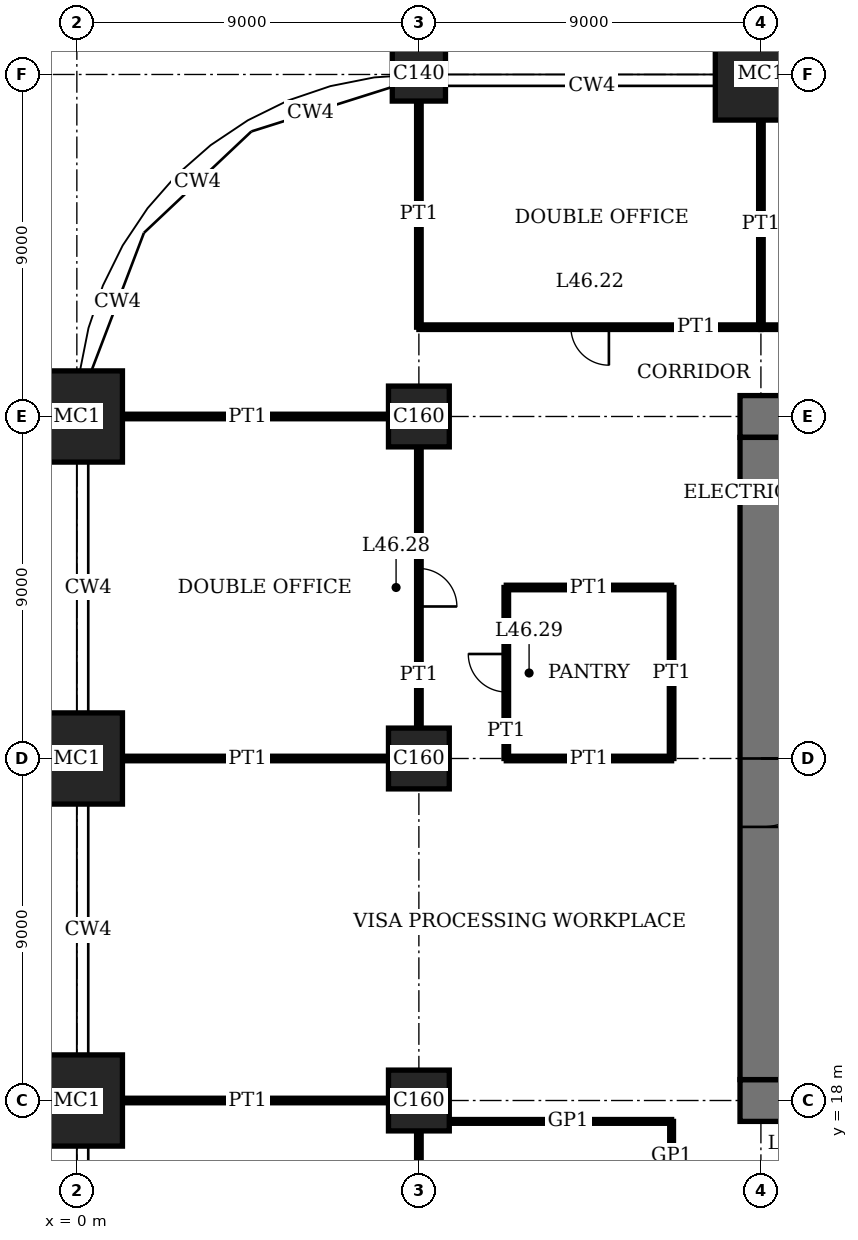
"""IFC4 building model, lengths in metres.
Left out: names, types, materials, properties, quantities, classifications, styles, units other than length and angle.
Written with IfcOpenShell. Run it as: python <this file> out.ifc"""

import sys

from ifc_helpers import new_model, si_unit, direction, frame, frame_2d, origin, origin_2d, place, context, subcontext, project, spatial, rectangle, extrude, element, fill, save


model = new_model("IFC4")
c1 = context("Model", 3, precision=1e-05, world=origin(), true_north=direction((0.0, 1.0)))
c2 = subcontext(c1, "Body", "Model", "MODEL_VIEW")
j1 = project(units=[si_unit("LENGTHUNIT", "METRE"), si_unit("PLANEANGLEUNIT", "RADIAN")], contexts=[c1])
p1 = place(None, origin())
s1 = spatial("IfcSite", under=j1, at=p1, CompositionType="ELEMENT")
p2 = place(p1, origin())
s2 = spatial("IfcBuilding", under=s1, at=p2, CompositionType="ELEMENT")
p3 = place(p2, frame((0.0, 0.0, 190.2)))
s3 = spatial("IfcBuildingStorey", under=s2, at=p3, CompositionType="ELEMENT", Elevation=190.2)
for number, where, z_axis, x_axis in (
    (1, (0.0, 18.0, 0.0), (0.0, 0.0, 1.0), (1.0, 0.0, 0.0)),
    (2, (0.0, 27.0, 0.0), (0.0, 0.0, 1.0), (1.0, 0.0, 0.0)),
    (3, (0.0, 36.0, 0.0), (0.0, 0.0, 1.0), (1.0, 0.0, 0.0)),
):
    element("IfcColumn", number, at=place(p3, frame(where, z_axis=z_axis, x_axis=x_axis)), inside=s3, PredefinedType="COLUMN", context=c2, shape_type="SweptSolid", body=[
        extrude(rectangle(XDim=2.4, YDim=2.4, at=origin_2d()), origin(), (0.0, 0.0, 1.0), 4.0),
    ])
for number, where, z_axis, x_axis in (
    (4, (9.0, 18.0, 0.0), (0.0, 0.0, 1.0), (1.0, 0.0, 0.0)),
    (5, (9.0, 27.0, 0.0), (0.0, 0.0, 1.0), (1.0, 0.0, 0.0)),
    (6, (9.0, 36.0, 0.0), (0.0, 0.0, 1.0), (1.0, 0.0, 0.0)),
):
    element("IfcColumn", number, at=place(p3, frame(where, z_axis=z_axis, x_axis=x_axis)), inside=s3, PredefinedType="COLUMN", context=c2, shape_type="SweptSolid", body=[
        extrude(rectangle(XDim=1.6, YDim=1.6, at=origin_2d()), origin(), (0.0, 0.0, 1.0), 4.0),
    ])
p4 = place(p3, frame((9.0, 45.0, 0.0), z_axis=(0.0, 0.0, 1.0), x_axis=(1.0, 0.0, 0.0)))
e7 = element("IfcColumn", 7, at=p4, inside=s3, PredefinedType="COLUMN", context=c2, shape_type="SweptSolid", body=[
    extrude(rectangle(XDim=1.4, YDim=1.4, at=origin_2d()), origin(), (0.0, 0.0, 1.0), 4.0),
])
p5 = place(p3, frame((18.0, 45.0, 0.0), z_axis=(0.0, 0.0, 1.0), x_axis=(1.0, 0.0, 0.0)))
e8 = element("IfcColumn", 8, at=p5, inside=s3, PredefinedType="COLUMN", context=c2, shape_type="SweptSolid", body=[
    extrude(rectangle(XDim=2.4, YDim=2.4, at=origin_2d()), origin(), (0.0, 0.0, 1.0), 4.0),
])
p6 = place(p3, frame((17.45, 18.0, 0.0), z_axis=(0.0, 0.0, 1.0), x_axis=(1.0, 0.0, 0.0)))
e9 = element("IfcWall", 9, at=p6, inside=s3, PredefinedType="SHEAR", context=c2, shape_type="SweptSolid", body=[
    extrude(rectangle(XDim=28.1, YDim=1.1, at=frame_2d((14.05, 0.0))), origin(), (0.0, 0.0, 1.0), 4.0),
])
p7 = place(p6, frame((11.55, 0.0, 0.0)))
e10 = element("IfcOpeningElement", 10, at=p7, cuts=e9, PredefinedType="OPENING", context=c2, shape_type="SweptSolid", body=[
    extrude(rectangle(XDim=1.0, YDim=2.4, at=frame_2d((0.5, 1.2))), frame((0.0, 0.56, 0.0), z_axis=(0.0, -1.0, 0.0), x_axis=(1.0, 0.0, 0.0)), (0.0, 0.0, 1.0), 1.12),
])
p8 = place(p6, frame((16.55, 0.0, 0.0)))
e11 = element("IfcOpeningElement", 11, at=p8, cuts=e9, PredefinedType="OPENING", context=c2, shape_type="SweptSolid", body=[
    extrude(rectangle(XDim=1.0, YDim=2.4, at=frame_2d((0.5, 1.2))), frame((0.0, 0.56, 0.0), z_axis=(0.0, -1.0, 0.0), x_axis=(1.0, 0.0, 0.0)), (0.0, 0.0, 1.0), 1.12),
])
p9 = place(p6, frame((20.0, 0.0, 0.0)))
e12 = element("IfcOpeningElement", 12, at=p9, cuts=e9, PredefinedType="OPENING", context=c2, shape_type="SweptSolid", body=[
    extrude(rectangle(XDim=1.1, YDim=2.4, at=frame_2d((0.55, 1.2))), frame((0.0, 0.56, 0.0), z_axis=(0.0, -1.0, 0.0), x_axis=(1.0, 0.0, 0.0)), (0.0, 0.0, 1.0), 1.12),
])
p10 = place(p6, frame((24.05, 0.0, 0.0)))
e13 = element("IfcOpeningElement", 13, at=p10, cuts=e9, PredefinedType="OPENING", context=c2, shape_type="SweptSolid", body=[
    extrude(rectangle(XDim=1.0, YDim=2.4, at=frame_2d((0.5, 1.2))), frame((0.0, 0.56, 0.0), z_axis=(0.0, -1.0, 0.0), x_axis=(1.0, 0.0, 0.0)), (0.0, 0.0, 1.0), 1.12),
])
p11 = place(p3, frame((45.55, 36.0, 0.0), z_axis=(0.0, 0.0, 1.0), x_axis=(-1.0, 0.0, 0.0)))
e14 = element("IfcWall", 14, at=p11, inside=s3, PredefinedType="SHEAR", context=c2, shape_type="SweptSolid", body=[
    extrude(rectangle(XDim=28.1, YDim=1.1, at=frame_2d((14.05, 0.0))), origin(), (0.0, 0.0, 1.0), 4.0),
])
p12 = place(p11, frame((11.55, 0.0, 0.0)))
e15 = element("IfcOpeningElement", 15, at=p12, cuts=e14, PredefinedType="OPENING", context=c2, shape_type="SweptSolid", body=[
    extrude(rectangle(XDim=1.0, YDim=2.4, at=frame_2d((0.5, 1.2))), frame((0.0, 0.56, 0.0), z_axis=(0.0, -1.0, 0.0), x_axis=(1.0, 0.0, 0.0)), (0.0, 0.0, 1.0), 1.12),
])
p13 = place(p11, frame((16.55, 0.0, 0.0)))
e16 = element("IfcOpeningElement", 16, at=p13, cuts=e14, PredefinedType="OPENING", context=c2, shape_type="SweptSolid", body=[
    extrude(rectangle(XDim=1.0, YDim=2.4, at=frame_2d((0.5, 1.2))), frame((0.0, 0.56, 0.0), z_axis=(0.0, -1.0, 0.0), x_axis=(1.0, 0.0, 0.0)), (0.0, 0.0, 1.0), 1.12),
])
p14 = place(p11, frame((20.0, 0.0, 0.0)))
e17 = element("IfcOpeningElement", 17, at=p14, cuts=e14, PredefinedType="OPENING", context=c2, shape_type="SweptSolid", body=[
    extrude(rectangle(XDim=1.1, YDim=2.4, at=frame_2d((0.55, 1.2))), frame((0.0, 0.56, 0.0), z_axis=(0.0, -1.0, 0.0), x_axis=(1.0, 0.0, 0.0)), (0.0, 0.0, 1.0), 1.12),
])
p15 = place(p11, frame((24.05, 0.0, 0.0)))
e18 = element("IfcOpeningElement", 18, at=p15, cuts=e14, PredefinedType="OPENING", context=c2, shape_type="SweptSolid", body=[
    extrude(rectangle(XDim=1.0, YDim=2.4, at=frame_2d((0.5, 1.2))), frame((0.0, 0.56, 0.0), z_axis=(0.0, -1.0, 0.0), x_axis=(1.0, 0.0, 0.0)), (0.0, 0.0, 1.0), 1.12),
])
p16 = place(p3, frame((18.0, 35.45, 0.0), z_axis=(0.0, 0.0, 1.0), x_axis=(0.0, -1.0, 0.0)))
e19 = element("IfcWall", 19, at=p16, inside=s3, PredefinedType="SHEAR", context=c2, shape_type="SweptSolid", body=[
    extrude(rectangle(XDim=16.9, YDim=1.1, at=frame_2d((8.45, 0.0))), origin(), (0.0, 0.0, 1.0), 4.0),
])
p17 = place(p16, frame((8.45, 0.0, 0.0)))
e20 = element("IfcOpeningElement", 20, at=p17, cuts=e19, PredefinedType="OPENING", context=c2, shape_type="SweptSolid", body=[
    extrude(rectangle(XDim=1.8, YDim=2.4, at=frame_2d((0.9, 1.2))), frame((0.0, 0.56, 0.0), z_axis=(0.0, -1.0, 0.0), x_axis=(1.0, 0.0, 0.0)), (0.0, 0.0, 1.0), 1.12),
])
p18 = place(p3, frame((9.8, 17.45, 0.0), z_axis=(0.0, 0.0, 1.0), x_axis=(1.0, 0.0, 0.0)))
e21 = element("IfcWall", 21, at=p18, inside=s3, PredefinedType="PARTITIONING", context=c2, shape_type="SweptSolid", body=[
    extrude(rectangle(XDim=5.85, YDim=0.1, at=frame_2d((2.925, 0.0))), origin(), (0.0, 0.0, 1.0), 3.75),
])
for number, where, z_axis, x_axis in (
    (22, (1.2, 18.0, 0.0), (0.0, 0.0, 1.0), (1.0, 0.0, 0.0)),
    (23, (1.2, 27.0, 0.0), (0.0, 0.0, 1.0), (1.0, 0.0, 0.0)),
):
    element("IfcWall", number, at=place(p3, frame(where, z_axis=z_axis, x_axis=x_axis)), inside=s3, PredefinedType="PARTITIONING", context=c2, shape_type="SweptSolid", body=[
        extrude(rectangle(XDim=7.0, YDim=0.12, at=frame_2d((3.5, 0.0))), origin(), (0.0, 0.0, 1.0), 3.05),
    ])
p19 = place(p3, frame((11.3, 27.0, 0.0), z_axis=(0.0, 0.0, 1.0), x_axis=(1.0, 0.0, 0.0)))
e24 = element("IfcWall", 24, at=p19, inside=s3, PredefinedType="PARTITIONING", context=c2, shape_type="SweptSolid", body=[
    extrude(rectangle(XDim=4.35, YDim=0.12, at=frame_2d((2.175, 0.0))), origin(), (0.0, 0.0, 1.0), 3.05),
])
p20 = place(p3, frame((11.3, 31.5, 0.0), z_axis=(0.0, 0.0, 1.0), x_axis=(1.0, 0.0, 0.0)))
e25 = element("IfcWall", 25, at=p20, inside=s3, PredefinedType="PARTITIONING", context=c2, shape_type="SweptSolid", body=[
    extrude(rectangle(XDim=4.35, YDim=0.12, at=frame_2d((2.175, 0.0))), origin(), (0.0, 0.0, 1.0), 3.1),
])
p21 = place(p3, frame((1.2, 36.0, 0.0), z_axis=(0.0, 0.0, 1.0), x_axis=(1.0, 0.0, 0.0)))
e26 = element("IfcWall", 26, at=p21, inside=s3, PredefinedType="PARTITIONING", context=c2, shape_type="SweptSolid", body=[
    extrude(rectangle(XDim=7.0, YDim=0.12, at=frame_2d((3.5, 0.0))), origin(), (0.0, 0.0, 1.0), 3.05),
])
p22 = place(p3, frame((9.0, 38.35, 0.0), z_axis=(0.0, 0.0, 1.0), x_axis=(1.0, 0.0, 0.0)))
e27 = element("IfcWall", 27, at=p22, inside=s3, PredefinedType="PARTITIONING", context=c2, shape_type="SweptSolid", body=[
    extrude(rectangle(XDim=9.0, YDim=0.12, at=frame_2d((4.5, 0.0))), origin(), (0.0, 0.0, 1.0), 3.75),
])
p23 = place(p22, frame((4.0, 0.0, 0.0)))
e28 = element("IfcOpeningElement", 28, at=p23, cuts=e27, PredefinedType="OPENING", context=c2, shape_type="SweptSolid", body=[
    extrude(rectangle(XDim=1.0, YDim=2.4, at=frame_2d((0.5, 1.2))), frame((0.0, 0.07, 0.0), z_axis=(0.0, -1.0, 0.0), x_axis=(1.0, 0.0, 0.0)), (0.0, 0.0, 1.0), 0.14),
])
p24 = place(p3, frame((18.0, 38.35, 0.0), z_axis=(0.0, 0.0, 1.0), x_axis=(1.0, 0.0, 0.0)))
e29 = element("IfcWall", 29, at=p24, inside=s3, PredefinedType="PARTITIONING", context=c2, shape_type="SweptSolid", body=[
    extrude(rectangle(XDim=9.0, YDim=0.12, at=frame_2d((4.5, 0.0))), origin(), (0.0, 0.0, 1.0), 3.75),
])
p25 = place(p24, frame((4.0, 0.0, 0.0)))
e30 = element("IfcOpeningElement", 30, at=p25, cuts=e29, PredefinedType="OPENING", context=c2, shape_type="SweptSolid", body=[
    extrude(rectangle(XDim=1.0, YDim=2.4, at=frame_2d((0.5, 1.2))), frame((0.0, 0.07, 0.0), z_axis=(0.0, -1.0, 0.0), x_axis=(1.0, 0.0, 0.0)), (0.0, 0.0, 1.0), 0.14),
])
p26 = place(p3, frame((9.0, 38.35, 0.0), z_axis=(0.0, 0.0, 1.0), x_axis=(0.0, 1.0, 0.0)))
e31 = element("IfcWall", 31, at=p26, inside=s3, PredefinedType="PARTITIONING", context=c2, shape_type="SweptSolid", body=[
    extrude(rectangle(XDim=5.95, YDim=0.12, at=frame_2d((2.975, 0.0))), origin(), (0.0, 0.0, 1.0), 3.05),
])
p27 = place(p3, frame((9.0, 9.8, 0.0), z_axis=(0.0, 0.0, 1.0), x_axis=(0.0, 1.0, 0.0)))
e32 = element("IfcWall", 32, at=p27, inside=s3, PredefinedType="PARTITIONING", context=c2, shape_type="SweptSolid", body=[
    extrude(rectangle(XDim=7.4, YDim=0.12, at=frame_2d((3.7, 0.0))), origin(), (0.0, 0.0, 1.0), 3.05),
])
p28 = place(p27, frame((3.2, 0.0, 0.0)))
e33 = element("IfcOpeningElement", 33, at=p28, cuts=e32, PredefinedType="OPENING", context=c2, shape_type="SweptSolid", body=[
    extrude(rectangle(XDim=1.0, YDim=2.4, at=frame_2d((0.5, 1.2))), frame((0.0, 0.07, 0.0), z_axis=(0.0, -1.0, 0.0), x_axis=(1.0, 0.0, 0.0)), (0.0, 0.0, 1.0), 0.14),
])
p29 = place(p3, frame((9.0, 27.8, 0.0), z_axis=(0.0, 0.0, 1.0), x_axis=(0.0, 1.0, 0.0)))
e34 = element("IfcWall", 34, at=p29, inside=s3, PredefinedType="PARTITIONING", context=c2, shape_type="SweptSolid", body=[
    extrude(rectangle(XDim=7.4, YDim=0.12, at=frame_2d((3.7, 0.0))), origin(), (0.0, 0.0, 1.0), 3.05),
])
p30 = place(p29, frame((3.2, 0.0, 0.0)))
e35 = element("IfcOpeningElement", 35, at=p30, cuts=e34, PredefinedType="OPENING", context=c2, shape_type="SweptSolid", body=[
    extrude(rectangle(XDim=1.0, YDim=2.4, at=frame_2d((0.5, 1.2))), frame((0.0, 0.07, 0.0), z_axis=(0.0, -1.0, 0.0), x_axis=(1.0, 0.0, 0.0)), (0.0, 0.0, 1.0), 0.14),
])
p31 = place(p3, frame((11.3, 27.0, 0.0), z_axis=(0.0, 0.0, 1.0), x_axis=(0.0, 1.0, 0.0)))
e36 = element("IfcWall", 36, at=p31, inside=s3, PredefinedType="PARTITIONING", context=c2, shape_type="SweptSolid", body=[
    extrude(rectangle(XDim=4.5, YDim=0.12, at=frame_2d((2.25, 0.0))), origin(), (0.0, 0.0, 1.0), 3.75),
])
p32 = place(p31, frame((1.75, 0.0, 0.0)))
e37 = element("IfcOpeningElement", 37, at=p32, cuts=e36, PredefinedType="OPENING", context=c2, shape_type="SweptSolid", body=[
    extrude(rectangle(XDim=1.0, YDim=2.4, at=frame_2d((0.5, 1.2))), frame((0.0, 0.07, 0.0), z_axis=(0.0, -1.0, 0.0), x_axis=(1.0, 0.0, 0.0)), (0.0, 0.0, 1.0), 0.14),
])
p33 = place(p3, frame((15.65, 27.0, 0.0), z_axis=(0.0, 0.0, 1.0), x_axis=(0.0, 1.0, 0.0)))
e38 = element("IfcWall", 38, at=p33, inside=s3, PredefinedType="PARTITIONING", context=c2, shape_type="SweptSolid", body=[
    extrude(rectangle(XDim=4.5, YDim=0.12, at=frame_2d((2.25, 0.0))), origin(), (0.0, 0.0, 1.0), 3.75),
])
p34 = place(p3, frame((15.65, 15.65, 0.0), z_axis=(0.0, 0.0, 1.0), x_axis=(0.0, 1.0, 0.0)))
e39 = element("IfcWall", 39, at=p34, inside=s3, PredefinedType="PARTITIONING", context=c2, shape_type="SweptSolid", body=[
    extrude(rectangle(XDim=1.8, YDim=0.1, at=frame_2d((0.9, 0.0))), origin(), (0.0, 0.0, 1.0), 3.75),
])
p35 = place(p3, frame((18.0, 38.35, 0.0), z_axis=(0.0, 0.0, 1.0), x_axis=(0.0, 1.0, 0.0)))
e40 = element("IfcWall", 40, at=p35, inside=s3, PredefinedType="PARTITIONING", context=c2, shape_type="SweptSolid", body=[
    extrude(rectangle(XDim=5.45, YDim=0.12, at=frame_2d((2.725, 0.0))), origin(), (0.0, 0.0, 1.0), 3.05),
])
p36 = place(p17, origin())
e41 = element("IfcDoor", 41, at=p36, inside=s3, OperationType="DOUBLE_DOOR_DOUBLE_SWING", PredefinedType="DOOR", context=c2, shape_type="SweptSolid", body=[
    extrude(rectangle(XDim=1.8, YDim=2.4, at=frame_2d((0.9, 1.2))), frame((0.0, 0.03, 0.0), z_axis=(0.0, -1.0, 0.0), x_axis=(1.0, 0.0, 0.0)), (0.0, 0.0, 1.0), 0.06),
    extrude(rectangle(XDim=0.04, YDim=2.4, at=frame_2d((0.02, 1.2))), frame((0.0, 0.55, 0.0), z_axis=(0.0, -1.0, 0.0), x_axis=(1.0, 0.0, 0.0)), (0.0, 0.0, 1.0), 1.1),
    extrude(rectangle(XDim=0.04, YDim=2.4, at=frame_2d((1.78, 1.2))), frame((0.0, 0.55, 0.0), z_axis=(0.0, -1.0, 0.0), x_axis=(1.0, 0.0, 0.0)), (0.0, 0.0, 1.0), 1.1),
    extrude(rectangle(XDim=1.8, YDim=0.04, at=frame_2d((0.9, 2.38))), frame((0.0, 0.55, 0.0), z_axis=(0.0, -1.0, 0.0), x_axis=(1.0, 0.0, 0.0)), (0.0, 0.0, 1.0), 1.1),
])
fill(e20, e41)
p37 = place(p23, origin())
e42 = element("IfcDoor", 42, at=p37, inside=s3, OperationType="SINGLE_SWING_RIGHT", PredefinedType="DOOR", context=c2, shape_type="SweptSolid", body=[
    extrude(rectangle(XDim=1.0, YDim=2.4, at=frame_2d((0.5, 1.2))), frame((0.0, 0.025, 0.0), z_axis=(0.0, -1.0, 0.0), x_axis=(1.0, 0.0, 0.0)), (0.0, 0.0, 1.0), 0.05),
])
fill(e28, e42)
p38 = place(p30, origin())
e43 = element("IfcDoor", 43, at=p38, inside=s3, OperationType="SINGLE_SWING_LEFT", PredefinedType="DOOR", context=c2, shape_type="SweptSolid", body=[
    extrude(rectangle(XDim=1.0, YDim=2.4, at=frame_2d((0.5, 1.2))), frame((0.0, 0.025, 0.0), z_axis=(0.0, -1.0, 0.0), x_axis=(1.0, 0.0, 0.0)), (0.0, 0.0, 1.0), 0.05),
])
fill(e35, e43)
p39 = place(p32, origin())
e44 = element("IfcDoor", 44, at=p39, inside=s3, OperationType="SINGLE_SWING_LEFT", PredefinedType="DOOR", context=c2, shape_type="SweptSolid", body=[
    extrude(rectangle(XDim=1.0, YDim=2.4, at=frame_2d((0.5, 1.2))), frame((0.0, 0.025, 0.0), z_axis=(0.0, -1.0, 0.0), x_axis=(1.0, 0.0, 0.0)), (0.0, 0.0, 1.0), 0.05),
])
fill(e37, e44)
save(model, sys.argv[1])
